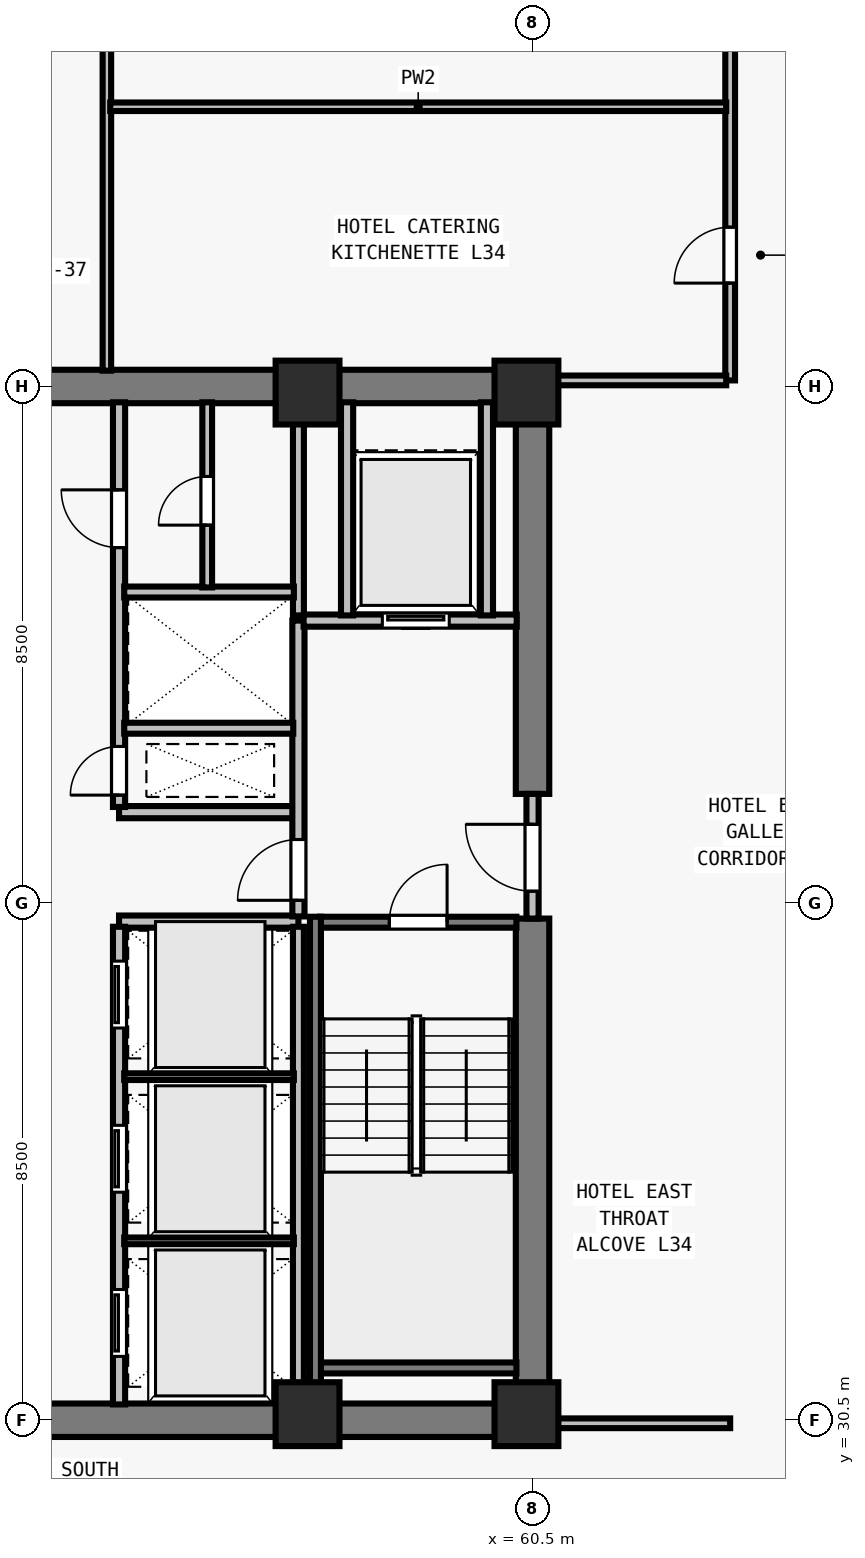
"""IFC4 building model, lengths in metres.
Left out: names, types, materials, properties, quantities, classifications, styles, units other than length and angle.
Written with IfcOpenShell. Run it as: python <this file> out.ifc"""

import sys

from ifc_helpers import new_model, si_unit, direction, frame, frame_2d, origin, origin_2d, place, context, subcontext, project, spatial, rectangle, extrude, element, fill, save


model = new_model("IFC4")
c1 = context("Model", 3, precision=1e-05, world=origin(), true_north=direction((0.0, 1.0)))
c2 = subcontext(c1, "Body", "Model", "MODEL_VIEW")
j1 = project(units=[si_unit("LENGTHUNIT", "METRE"), si_unit("PLANEANGLEUNIT", "RADIAN")], contexts=[c1])
p1 = place(None, origin())
s1 = spatial("IfcSite", under=j1, at=p1, CompositionType="ELEMENT")
p2 = place(p1, origin())
s2 = spatial("IfcBuilding", under=s1, at=p2, CompositionType="ELEMENT")
p3 = place(p2, frame((0.0, 0.0, 127.0)))
s3 = spatial("IfcBuildingStorey", under=s2, at=p3, CompositionType="ELEMENT", Elevation=127.0)
for number, where, z_axis, x_axis in (
    (1, (56.8, 30.6, 0.0), (0.0, 0.0, 1.0), (1.0, 0.0, 0.0)),
    (2, (60.4, 30.6, 0.0), (0.0, 0.0, 1.0), (1.0, 0.0, 0.0)),
    (3, (56.8, 47.4, 0.0), (0.0, 0.0, 1.0), (1.0, 0.0, 0.0)),
    (4, (60.4, 47.4, 0.0), (0.0, 0.0, 1.0), (1.0, 0.0, 0.0)),
):
    element("IfcColumn", number, at=place(p3, frame(where, z_axis=z_axis, x_axis=x_axis)), inside=s3, PredefinedType="COLUMN", context=c2, shape_type="SweptSolid", body=[
        extrude(rectangle(XDim=1.05, YDim=1.05, at=origin_2d()), origin(), (0.0, 0.0, 1.0), 3.5),
    ])
for number, where, z_axis, x_axis in (
    (5, (43.225, 30.5, 0.0), (0.0, 0.0, 1.0), (1.0, 0.0, 0.0)),
    (6, (43.225, 47.5, 0.0), (0.0, 0.0, 1.0), (1.0, 0.0, 0.0)),
):
    element("IfcWall", number, at=place(p3, frame(where, z_axis=z_axis, x_axis=x_axis)), inside=s3, PredefinedType="SHEAR", context=c2, shape_type="SweptSolid", body=[
        extrude(rectangle(XDim=17.55, YDim=0.55, at=frame_2d((8.775, 0.0))), origin(), (0.0, 0.0, 1.0), 3.28),
    ])
p4 = place(p3, frame((60.5, 30.765, 0.0), z_axis=(0.0, 0.0, 1.0), x_axis=(0.0, 1.0, 0.0)))
e7 = element("IfcWall", 7, at=p4, inside=s3, PredefinedType="SHEAR", context=c2, shape_type="SweptSolid", body=[
    extrude(rectangle(XDim=7.985, YDim=0.55, at=frame_2d((3.993, 0.0))), origin(), (0.0, 0.0, 1.0), 3.28),
])
p5 = place(p3, frame((60.5, 40.8, 0.0), z_axis=(0.0, 0.0, 1.0), x_axis=(0.0, 1.0, 0.0)))
e8 = element("IfcWall", 8, at=p5, inside=s3, PredefinedType="SHEAR", context=c2, shape_type="SweptSolid", body=[
    extrude(rectangle(XDim=6.435, YDim=0.55, at=frame_2d((3.218, 0.0))), origin(), (0.0, 0.0, 1.0), 3.28),
])
for number, where, z_axis, x_axis in (
    (9, (53.7, 38.7, 0.0), (0.0, 0.0, 1.0), (1.0, 0.0, 0.0)),
    (10, (53.7, 40.5, 0.0), (0.0, 0.0, 1.0), (1.0, 0.0, 0.0)),
):
    element("IfcWall", number, at=place(p3, frame(where, z_axis=z_axis, x_axis=x_axis)), inside=s3, PredefinedType="SOLIDWALL", context=c2, shape_type="SweptSolid", body=[
        extrude(rectangle(XDim=2.95, YDim=0.2, at=frame_2d((1.475, 0.0))), origin(), (0.0, 0.0, 1.0), 3.28),
    ])
p6 = place(p3, frame((53.7, 30.76, 0.0), z_axis=(0.0, 0.0, 1.0), x_axis=(0.0, 1.0, 0.0)))
e11 = element("IfcWall", 11, at=p6, inside=s3, PredefinedType="SOLIDWALL", context=c2, shape_type="SweptSolid", body=[
    extrude(rectangle(XDim=7.855, YDim=0.2, at=frame_2d((3.927, 0.0))), origin(), (0.0, 0.0, 1.0), 3.28),
])
p7 = place(p6, frame((0.79, 0.0, 0.0)))
e12 = element("IfcOpeningElement", 12, at=p7, cuts=e11, PredefinedType="OPENING", context=c2, shape_type="SweptSolid", body=[
    extrude(rectangle(XDim=1.1, YDim=2.2, at=frame_2d((0.55, 1.1))), frame((0.0, 0.11, 0.0), z_axis=(0.0, -1.0, 0.0), x_axis=(1.0, 0.0, 0.0)), (0.0, 0.0, 1.0), 0.22),
])
p8 = place(p6, frame((3.49, 0.0, 0.0)))
e13 = element("IfcOpeningElement", 13, at=p8, cuts=e11, PredefinedType="OPENING", context=c2, shape_type="SweptSolid", body=[
    extrude(rectangle(XDim=1.1, YDim=2.2, at=frame_2d((0.55, 1.1))), frame((0.0, 0.11, 0.0), z_axis=(0.0, -1.0, 0.0), x_axis=(1.0, 0.0, 0.0)), (0.0, 0.0, 1.0), 0.22),
])
p9 = place(p6, frame((6.19, 0.0, 0.0)))
e14 = element("IfcOpeningElement", 14, at=p9, cuts=e11, PredefinedType="OPENING", context=c2, shape_type="SweptSolid", body=[
    extrude(rectangle(XDim=1.1, YDim=2.2, at=frame_2d((0.55, 1.1))), frame((0.0, 0.11, 0.0), z_axis=(0.0, -1.0, 0.0), x_axis=(1.0, 0.0, 0.0)), (0.0, 0.0, 1.0), 0.22),
])
p10 = place(p3, frame((53.7, 40.585, 0.0), z_axis=(0.0, 0.0, 1.0), x_axis=(0.0, 1.0, 0.0)))
e15 = element("IfcWall", 15, at=p10, inside=s3, PredefinedType="SOLIDWALL", context=c2, shape_type="SweptSolid", body=[
    extrude(rectangle(XDim=6.655, YDim=0.2, at=frame_2d((3.328, 0.0))), origin(), (0.0, 0.0, 1.0), 3.28),
])
p11 = place(p10, frame((0.195, 0.0, 0.0)))
e16 = element("IfcOpeningElement", 16, at=p11, cuts=e15, PredefinedType="OPENING", context=c2, shape_type="SweptSolid", body=[
    extrude(rectangle(XDim=0.8, YDim=2.08, at=frame_2d((0.4, 1.04))), frame((0.0, 0.11, 0.0), z_axis=(0.0, -1.0, 0.0), x_axis=(1.0, 0.0, 0.0)), (0.0, 0.0, 1.0), 0.22),
])
p12 = place(p10, frame((4.265, 0.0, 0.0)))
e17 = element("IfcOpeningElement", 17, at=p12, cuts=e15, PredefinedType="OPENING", context=c2, shape_type="SweptSolid", body=[
    extrude(rectangle(XDim=0.95, YDim=2.12, at=frame_2d((0.475, 1.06))), frame((0.0, 0.11, 0.0), z_axis=(0.0, -1.0, 0.0), x_axis=(1.0, 0.0, 0.0)), (0.0, 0.0, 1.0), 0.22),
])
p13 = place(p3, frame((60.5, 38.75, 0.0), z_axis=(0.0, 0.0, 1.0), x_axis=(0.0, 1.0, 0.0)))
e18 = element("IfcWall", 18, at=p13, inside=s3, PredefinedType="SOLIDWALL", context=c2, shape_type="SweptSolid", body=[
    extrude(rectangle(XDim=2.05, YDim=0.2, at=frame_2d((1.025, 0.0))), origin(), (0.0, 0.0, 1.0), 3.28),
])
p14 = place(p13, frame((0.45, 0.0, 0.0)))
e19 = element("IfcOpeningElement", 19, at=p14, cuts=e18, PredefinedType="OPENING", context=c2, shape_type="SweptSolid", body=[
    extrude(rectangle(XDim=1.1, YDim=2.15, at=frame_2d((0.55, 1.075))), frame((0.0, 0.11, 0.0), z_axis=(0.0, -1.0, 0.0), x_axis=(1.0, 0.0, 0.0)), (0.0, 0.0, 1.0), 0.22),
])
p15 = place(p3, frame((56.65, 38.785, 0.0), z_axis=(0.0, 0.0, 1.0), x_axis=(0.0, 1.0, 0.0)))
e20 = element("IfcWall", 20, at=p15, inside=s3, PredefinedType="SOLIDWALL", context=c2, shape_type="SweptSolid", body=[
    extrude(rectangle(XDim=4.865, YDim=0.2, at=frame_2d((2.433, 0.0))), origin(), (0.0, 0.0, 1.0), 3.28),
])
p16 = place(p15, frame((0.265, 0.0, 0.0)))
e21 = element("IfcOpeningElement", 21, at=p16, cuts=e20, PredefinedType="OPENING", context=c2, shape_type="SweptSolid", body=[
    extrude(rectangle(XDim=1.0, YDim=2.15, at=frame_2d((0.5, 1.075))), frame((0.0, 0.11, 0.0), z_axis=(0.0, -1.0, 0.0), x_axis=(1.0, 0.0, 0.0)), (0.0, 0.0, 1.0), 0.22),
])
p17 = place(p3, frame((56.735, 43.65, 0.0), z_axis=(0.0, 0.0, 1.0), x_axis=(1.0, 0.0, 0.0)))
e22 = element("IfcWall", 22, at=p17, inside=s3, PredefinedType="SOLIDWALL", context=c2, shape_type="SweptSolid", body=[
    extrude(rectangle(XDim=3.505, YDim=0.2, at=frame_2d((1.752, 0.0))), origin(), (0.0, 0.0, 1.0), 3.28),
])
p18 = place(p17, frame((1.295, 0.0, 0.0)))
e23 = element("IfcOpeningElement", 23, at=p18, cuts=e22, PredefinedType="OPENING", context=c2, shape_type="SweptSolid", body=[
    extrude(rectangle(XDim=1.1, YDim=2.2, at=frame_2d((0.55, 1.1))), frame((0.0, 0.11, 0.0), z_axis=(0.0, -1.0, 0.0), x_axis=(1.0, 0.0, 0.0)), (0.0, 0.0, 1.0), 0.22),
])
for number, where, z_axis, x_axis in (
    (24, (57.45, 43.735, 0.0), (0.0, 0.0, 1.0), (0.0, 1.0, 0.0)),
    (25, (59.75, 43.735, 0.0), (0.0, 0.0, 1.0), (0.0, 1.0, 0.0)),
):
    element("IfcWall", number, at=place(p3, frame(where, z_axis=z_axis, x_axis=x_axis)), inside=s3, PredefinedType="SOLIDWALL", context=c2, shape_type="SweptSolid", body=[
        extrude(rectangle(XDim=3.505, YDim=0.2, at=frame_2d((1.752, 0.0))), origin(), (0.0, 0.0, 1.0), 3.28),
    ])
p19 = place(p3, frame((56.65, 30.76, 0.0), z_axis=(0.0, 0.0, 1.0), x_axis=(0.0, 1.0, 0.0)))
e26 = element("IfcWall", 26, at=p19, inside=s3, PredefinedType="SOLIDWALL", context=c2, shape_type="SweptSolid", body=[
    extrude(rectangle(XDim=7.855, YDim=0.18, at=frame_2d((3.927, 0.0))), origin(), (0.0, 0.0, 1.0), 3.28),
])
for number, where, z_axis, x_axis in (
    (27, (53.785, 33.45, 0.0), (0.0, 0.0, 1.0), (1.0, 0.0, 0.0)),
    (28, (53.785, 36.15, 0.0), (0.0, 0.0, 1.0), (1.0, 0.0, 0.0)),
):
    element("IfcWall", number, at=place(p3, frame(where, z_axis=z_axis, x_axis=x_axis)), inside=s3, PredefinedType="PARTITIONING", context=c2, shape_type="SweptSolid", body=[
        extrude(rectangle(XDim=2.79, YDim=0.11, at=frame_2d((1.395, 0.0))), origin(), (0.0, 0.0, 1.0), 3.28),
    ])
p20 = place(p3, frame((56.65, 43.735, 0.0), z_axis=(0.0, 0.0, 1.0), x_axis=(0.0, 1.0, 0.0)))
e29 = element("IfcWall", 29, at=p20, inside=s3, PredefinedType="SOLIDWALL", context=c2, shape_type="SweptSolid", body=[
    extrude(rectangle(XDim=3.505, YDim=0.18, at=frame_2d((1.752, 0.0))), origin(), (0.0, 0.0, 1.0), 3.28),
])
p21 = place(p3, frame((53.785, 41.88, 0.0), z_axis=(0.0, 0.0, 1.0), x_axis=(1.0, 0.0, 0.0)))
e30 = element("IfcWall", 30, at=p21, inside=s3, PredefinedType="SOLIDWALL", context=c2, shape_type="SweptSolid", body=[
    extrude(rectangle(XDim=2.78, YDim=0.18, at=frame_2d((1.39, 0.0))), origin(), (0.0, 0.0, 1.0), 3.28),
])
p22 = place(p3, frame((53.785, 44.12, 0.0), z_axis=(0.0, 0.0, 1.0), x_axis=(1.0, 0.0, 0.0)))
e31 = element("IfcWall", 31, at=p22, inside=s3, PredefinedType="SOLIDWALL", context=c2, shape_type="SweptSolid", body=[
    extrude(rectangle(XDim=2.79, YDim=0.18, at=frame_2d((1.395, 0.0))), origin(), (0.0, 0.0, 1.0), 3.28),
])
p23 = place(p3, frame((55.15, 44.195, 0.0), z_axis=(0.0, 0.0, 1.0), x_axis=(0.0, 1.0, 0.0)))
e32 = element("IfcWall", 32, at=p23, inside=s3, PredefinedType="PARTITIONING", context=c2, shape_type="SweptSolid", body=[
    extrude(rectangle(XDim=3.045, YDim=0.16, at=frame_2d((1.522, 0.0))), origin(), (0.0, 0.0, 1.0), 3.28),
])
p24 = place(p23, frame((1.025, 0.0, 0.0)))
e33 = element("IfcOpeningElement", 33, at=p24, cuts=e32, PredefinedType="OPENING", context=c2, shape_type="SweptSolid", body=[
    extrude(rectangle(XDim=0.8, YDim=2.1, at=frame_2d((0.4, 1.05))), frame((0.0, 0.09, 0.0), z_axis=(0.0, -1.0, 0.0), x_axis=(1.0, 0.0, 0.0)), (0.0, 0.0, 1.0), 0.18),
])
p25 = place(p3, frame((63.75, 47.6, 0.0), z_axis=(0.0, 0.0, 1.0), x_axis=(0.0, 1.0, 0.0)))
e34 = element("IfcWall", 34, at=p25, inside=s3, PredefinedType="PARTITIONING", context=c2, shape_type="SweptSolid", body=[
    extrude(rectangle(XDim=15.075, YDim=0.16, at=frame_2d((7.538, 0.0))), origin(), (0.0, 0.0, 1.0), 2.555),
])
p26 = place(p25, frame((1.6, 0.0, 0.0)))
e35 = element("IfcOpeningElement", 35, at=p26, cuts=e34, PredefinedType="OPENING", context=c2, shape_type="SweptSolid", body=[
    extrude(rectangle(XDim=0.92, YDim=2.12, at=frame_2d((0.46, 1.06))), frame((0.0, 0.09, 0.0), z_axis=(0.0, -1.0, 0.0), x_axis=(1.0, 0.0, 0.0)), (0.0, 0.0, 1.0), 0.18),
])
p27 = place(p25, frame((6.2, 0.0, 0.0)))
e36 = element("IfcOpeningElement", 36, at=p27, cuts=e34, PredefinedType="OPENING", context=c2, shape_type="SweptSolid", body=[
    extrude(rectangle(XDim=0.96, YDim=2.12, at=frame_2d((0.48, 1.06))), frame((0.0, 0.09, 0.0), z_axis=(0.0, -1.0, 0.0), x_axis=(1.0, 0.0, 0.0)), (0.0, 0.0, 1.0), 0.18),
])
p28 = place(p3, frame((60.765, 30.45, 0.0), z_axis=(0.0, 0.0, 1.0), x_axis=(1.0, 0.0, 0.0)))
e37 = element("IfcWall", 37, at=p28, inside=s3, PredefinedType="PARTITIONING", context=c2, shape_type="SweptSolid", body=[
    extrude(rectangle(XDim=2.985, YDim=0.16, at=frame_2d((1.493, 0.0))), origin(), (0.0, 0.0, 1.0), 3.28),
])
p29 = place(p3, frame((60.765, 47.6, 0.0), z_axis=(0.0, 0.0, 1.0), x_axis=(1.0, 0.0, 0.0)))
e38 = element("IfcWall", 38, at=p29, inside=s3, PredefinedType="PARTITIONING", context=c2, shape_type="SweptSolid", body=[
    extrude(rectangle(XDim=2.92, YDim=0.16, at=frame_2d((1.46, 0.0))), origin(), (0.0, 0.0, 1.0), 3.28),
])
p30 = place(p3, frame((53.5, 47.76, 0.0), z_axis=(0.0, 0.0, 1.0), x_axis=(0.0, 1.0, 0.0)))
e39 = element("IfcWall", 39, at=p30, inside=s3, PredefinedType="PARTITIONING", context=c2, shape_type="SweptSolid", body=[
    extrude(rectangle(XDim=14.915, YDim=0.14, at=frame_2d((7.458, 0.0))), origin(), (0.0, 0.0, 1.0), 2.896),
])
p31 = place(p3, frame((53.555, 52.1, 0.0), z_axis=(0.0, 0.0, 1.0), x_axis=(1.0, 0.0, 0.0)))
e40 = element("IfcWall", 40, at=p31, inside=s3, PredefinedType="PARTITIONING", context=c2, shape_type="SweptSolid", body=[
    extrude(rectangle(XDim=10.13, YDim=0.14, at=frame_2d((5.065, 0.0))), origin(), (0.0, 0.0, 1.0), 3.28),
])
p32 = place(p3, frame((57.005, 38.69, 0.0), z_axis=(0.0, 0.0, 1.0), x_axis=(1.0, 0.0, 0.0)))
e41 = element("IfcWall", 41, at=p32, inside=s3, PredefinedType="SOLIDWALL", context=c2, shape_type="SweptSolid", body=[
    extrude(rectangle(XDim=3.23, YDim=0.18, at=frame_2d((1.615, 0.0))), origin(), (0.0, 0.0, 1.0), 3.28),
])
p33 = place(p32, frame((1.14, 0.0, 0.0)))
e42 = element("IfcOpeningElement", 42, at=p33, cuts=e41, PredefinedType="OPENING", context=c2, shape_type="SweptSolid", body=[
    extrude(rectangle(XDim=0.95, YDim=2.15, at=frame_2d((0.475, 1.075))), frame((0.0, 0.1, 0.0), z_axis=(0.0, -1.0, 0.0), x_axis=(1.0, 0.0, 0.0)), (0.0, 0.0, 1.0), 0.2),
])
p34 = place(p3, frame((57.005, 31.36, 0.0), z_axis=(0.0, 0.0, 1.0), x_axis=(1.0, 0.0, 0.0)))
e43 = element("IfcWall", 43, at=p34, inside=s3, PredefinedType="SOLIDWALL", context=c2, shape_type="SweptSolid", body=[
    extrude(rectangle(XDim=3.23, YDim=0.18, at=frame_2d((1.615, 0.0))), origin(), (0.0, 0.0, 1.0), 3.28),
])
p35 = place(p3, frame((56.93, 38.78, 0.0), z_axis=(0.0, 0.0, 1.0), x_axis=(0.0, -1.0, 0.0)))
e44 = element("IfcWall", 44, at=p35, inside=s3, PredefinedType="SOLIDWALL", context=c2, shape_type="SweptSolid", body=[
    extrude(rectangle(XDim=8.017, YDim=0.18, at=frame_2d((4.009, 0.0))), origin(), (0.0, 0.0, 1.0), 3.28),
])
p36 = place(p14, origin())
e45 = element("IfcDoor", 45, at=p36, inside=s3, OperationType="SINGLE_SWING_RIGHT", PredefinedType="DOOR", context=c2, shape_type="SweptSolid", body=[
    extrude(rectangle(XDim=1.1, YDim=2.15, at=frame_2d((0.55, 1.075))), frame((0.0, 0.025, 0.0), z_axis=(0.0, -1.0, 0.0), x_axis=(1.0, 0.0, 0.0)), (0.0, 0.0, 1.0), 0.05),
])
fill(e19, e45)
p37 = place(p16, origin())
e46 = element("IfcDoor", 46, at=p37, inside=s3, OperationType="SINGLE_SWING_LEFT", PredefinedType="DOOR", context=c2, shape_type="SweptSolid", body=[
    extrude(rectangle(XDim=1.0, YDim=2.15, at=frame_2d((0.5, 1.075))), frame((0.0, 0.025, 0.0), z_axis=(0.0, -1.0, 0.0), x_axis=(1.0, 0.0, 0.0)), (0.0, 0.0, 1.0), 0.05),
])
fill(e21, e46)
p38 = place(p18, origin())
e47 = element("IfcDoor", 47, at=p38, inside=s3, OperationType="SLIDING_TO_LEFT", PredefinedType="DOOR", context=c2, shape_type="SweptSolid", body=[
    extrude(rectangle(XDim=1.1, YDim=2.2, at=frame_2d((0.55, 1.1))), frame((0.0, 0.025, 0.0), z_axis=(0.0, -1.0, 0.0), x_axis=(1.0, 0.0, 0.0)), (0.0, 0.0, 1.0), 0.05),
])
fill(e23, e47)
p39 = place(p7, origin())
e48 = element("IfcDoor", 48, at=p39, inside=s3, OperationType="SLIDING_TO_LEFT", PredefinedType="DOOR", context=c2, shape_type="SweptSolid", body=[
    extrude(rectangle(XDim=1.1, YDim=2.2, at=frame_2d((0.55, 1.1))), frame((0.0, 0.025, 0.0), z_axis=(0.0, -1.0, 0.0), x_axis=(1.0, 0.0, 0.0)), (0.0, 0.0, 1.0), 0.05),
])
fill(e12, e48)
p40 = place(p8, origin())
e49 = element("IfcDoor", 49, at=p40, inside=s3, OperationType="SLIDING_TO_LEFT", PredefinedType="DOOR", context=c2, shape_type="SweptSolid", body=[
    extrude(rectangle(XDim=1.1, YDim=2.2, at=frame_2d((0.55, 1.1))), frame((0.0, 0.025, 0.0), z_axis=(0.0, -1.0, 0.0), x_axis=(1.0, 0.0, 0.0)), (0.0, 0.0, 1.0), 0.05),
])
fill(e13, e49)
p41 = place(p9, origin())
e50 = element("IfcDoor", 50, at=p41, inside=s3, OperationType="SLIDING_TO_LEFT", PredefinedType="DOOR", context=c2, shape_type="SweptSolid", body=[
    extrude(rectangle(XDim=1.1, YDim=2.2, at=frame_2d((0.55, 1.1))), frame((0.0, 0.025, 0.0), z_axis=(0.0, -1.0, 0.0), x_axis=(1.0, 0.0, 0.0)), (0.0, 0.0, 1.0), 0.05),
])
fill(e14, e50)
p42 = place(p11, origin())
e51 = element("IfcDoor", 51, at=p42, inside=s3, OperationType="SINGLE_SWING_LEFT", PredefinedType="DOOR", context=c2, shape_type="SweptSolid", body=[
    extrude(rectangle(XDim=0.8, YDim=2.08, at=frame_2d((0.4, 1.04))), frame((0.0, 0.025, 0.0), z_axis=(0.0, -1.0, 0.0), x_axis=(1.0, 0.0, 0.0)), (0.0, 0.0, 1.0), 0.05),
])
fill(e16, e51)
p43 = place(p12, origin())
e52 = element("IfcDoor", 52, at=p43, inside=s3, OperationType="SINGLE_SWING_RIGHT", PredefinedType="DOOR", context=c2, shape_type="SweptSolid", body=[
    extrude(rectangle(XDim=0.95, YDim=2.12, at=frame_2d((0.475, 1.06))), frame((0.0, 0.025, 0.0), z_axis=(0.0, -1.0, 0.0), x_axis=(1.0, 0.0, 0.0)), (0.0, 0.0, 1.0), 0.05),
])
fill(e17, e52)
p44 = place(p24, origin())
e53 = element("IfcDoor", 53, at=p44, inside=s3, OperationType="SINGLE_SWING_LEFT", PredefinedType="DOOR", context=c2, shape_type="SweptSolid", body=[
    extrude(rectangle(XDim=0.8, YDim=2.1, at=frame_2d((0.4, 1.05))), frame((0.0, 0.025, 0.0), z_axis=(0.0, -1.0, 0.0), x_axis=(1.0, 0.0, 0.0)), (0.0, 0.0, 1.0), 0.05),
])
fill(e33, e53)
p45 = place(p26, origin())
e54 = element("IfcDoor", 54, at=p45, inside=s3, OperationType="SINGLE_SWING_LEFT", PredefinedType="DOOR", context=c2, shape_type="SweptSolid", body=[
    extrude(rectangle(XDim=0.92, YDim=2.12, at=frame_2d((0.46, 1.06))), frame((0.0, 0.025, 0.0), z_axis=(0.0, -1.0, 0.0), x_axis=(1.0, 0.0, 0.0)), (0.0, 0.0, 1.0), 0.05),
])
fill(e35, e54)
p46 = place(p33, origin())
e55 = element("IfcDoor", 55, at=p46, inside=s3, OperationType="SINGLE_SWING_RIGHT", PredefinedType="DOOR", context=c2, shape_type="SweptSolid", body=[
    extrude(rectangle(XDim=0.95, YDim=2.15, at=frame_2d((0.475, 1.075))), frame((0.0, 0.025, 0.0), z_axis=(0.0, -1.0, 0.0), x_axis=(1.0, 0.0, 0.0)), (0.0, 0.0, 1.0), 0.05),
])
fill(e42, e55)
save(model, sys.argv[1])
